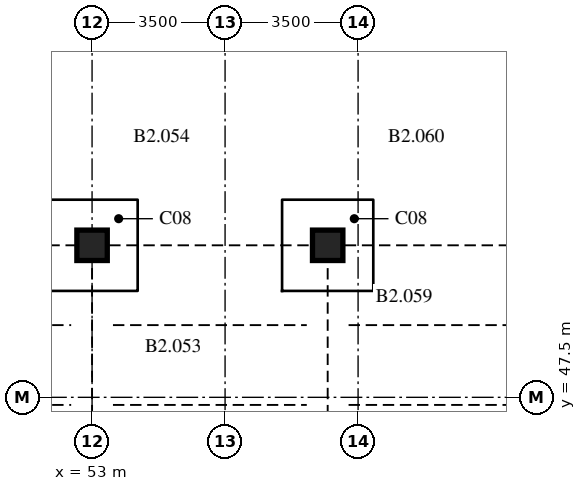
"""IFC4 building model, lengths in metres.
Left out: names, types, materials, properties, quantities, classifications, styles, units other than length and angle.
Written with IfcOpenShell. Run it as: python <this file> out.ifc"""

import sys

from ifc_helpers import new_model, si_unit, direction, frame, origin, origin_2d, place, context, subcontext, project, spatial, rectangle, extrude, element, save


model = new_model("IFC4")
c1 = context("Model", 3, precision=1e-05, world=origin(), true_north=direction((0.0, 1.0)))
c2 = subcontext(c1, "Body", "Model", "MODEL_VIEW")
j1 = project(units=[si_unit("LENGTHUNIT", "METRE"), si_unit("PLANEANGLEUNIT", "RADIAN")], contexts=[c1])
p1 = place(None, origin())
s1 = spatial("IfcSite", under=j1, at=p1, CompositionType="ELEMENT")
p2 = place(p1, origin())
s2 = spatial("IfcBuilding", under=s1, at=p2, CompositionType="ELEMENT")
p3 = place(p2, frame((0.0, 0.0, -7.5)))
s3 = spatial("IfcBuildingStorey", under=s2, at=p3, CompositionType="ELEMENT", Elevation=-7.5)
for number, where, z_axis, x_axis in (
    (1, (53.0, 51.5, -0.6), (0.0, 0.0, 1.0), (1.0, 0.0, 0.0)),
    (2, (59.2, 51.5, -0.6), (0.0, 0.0, 1.0), (1.0, 0.0, 0.0)),
):
    element("IfcColumn", number, at=place(p3, frame(where, z_axis=z_axis, x_axis=x_axis)), inside=s3, PredefinedType="COLUMN", context=c2, shape_type="SweptSolid", body=[
        extrude(rectangle(XDim=0.8, YDim=0.8, at=origin_2d()), origin(), (0.0, 0.0, 1.0), 4.1),
    ])
save(model, sys.argv[1])
